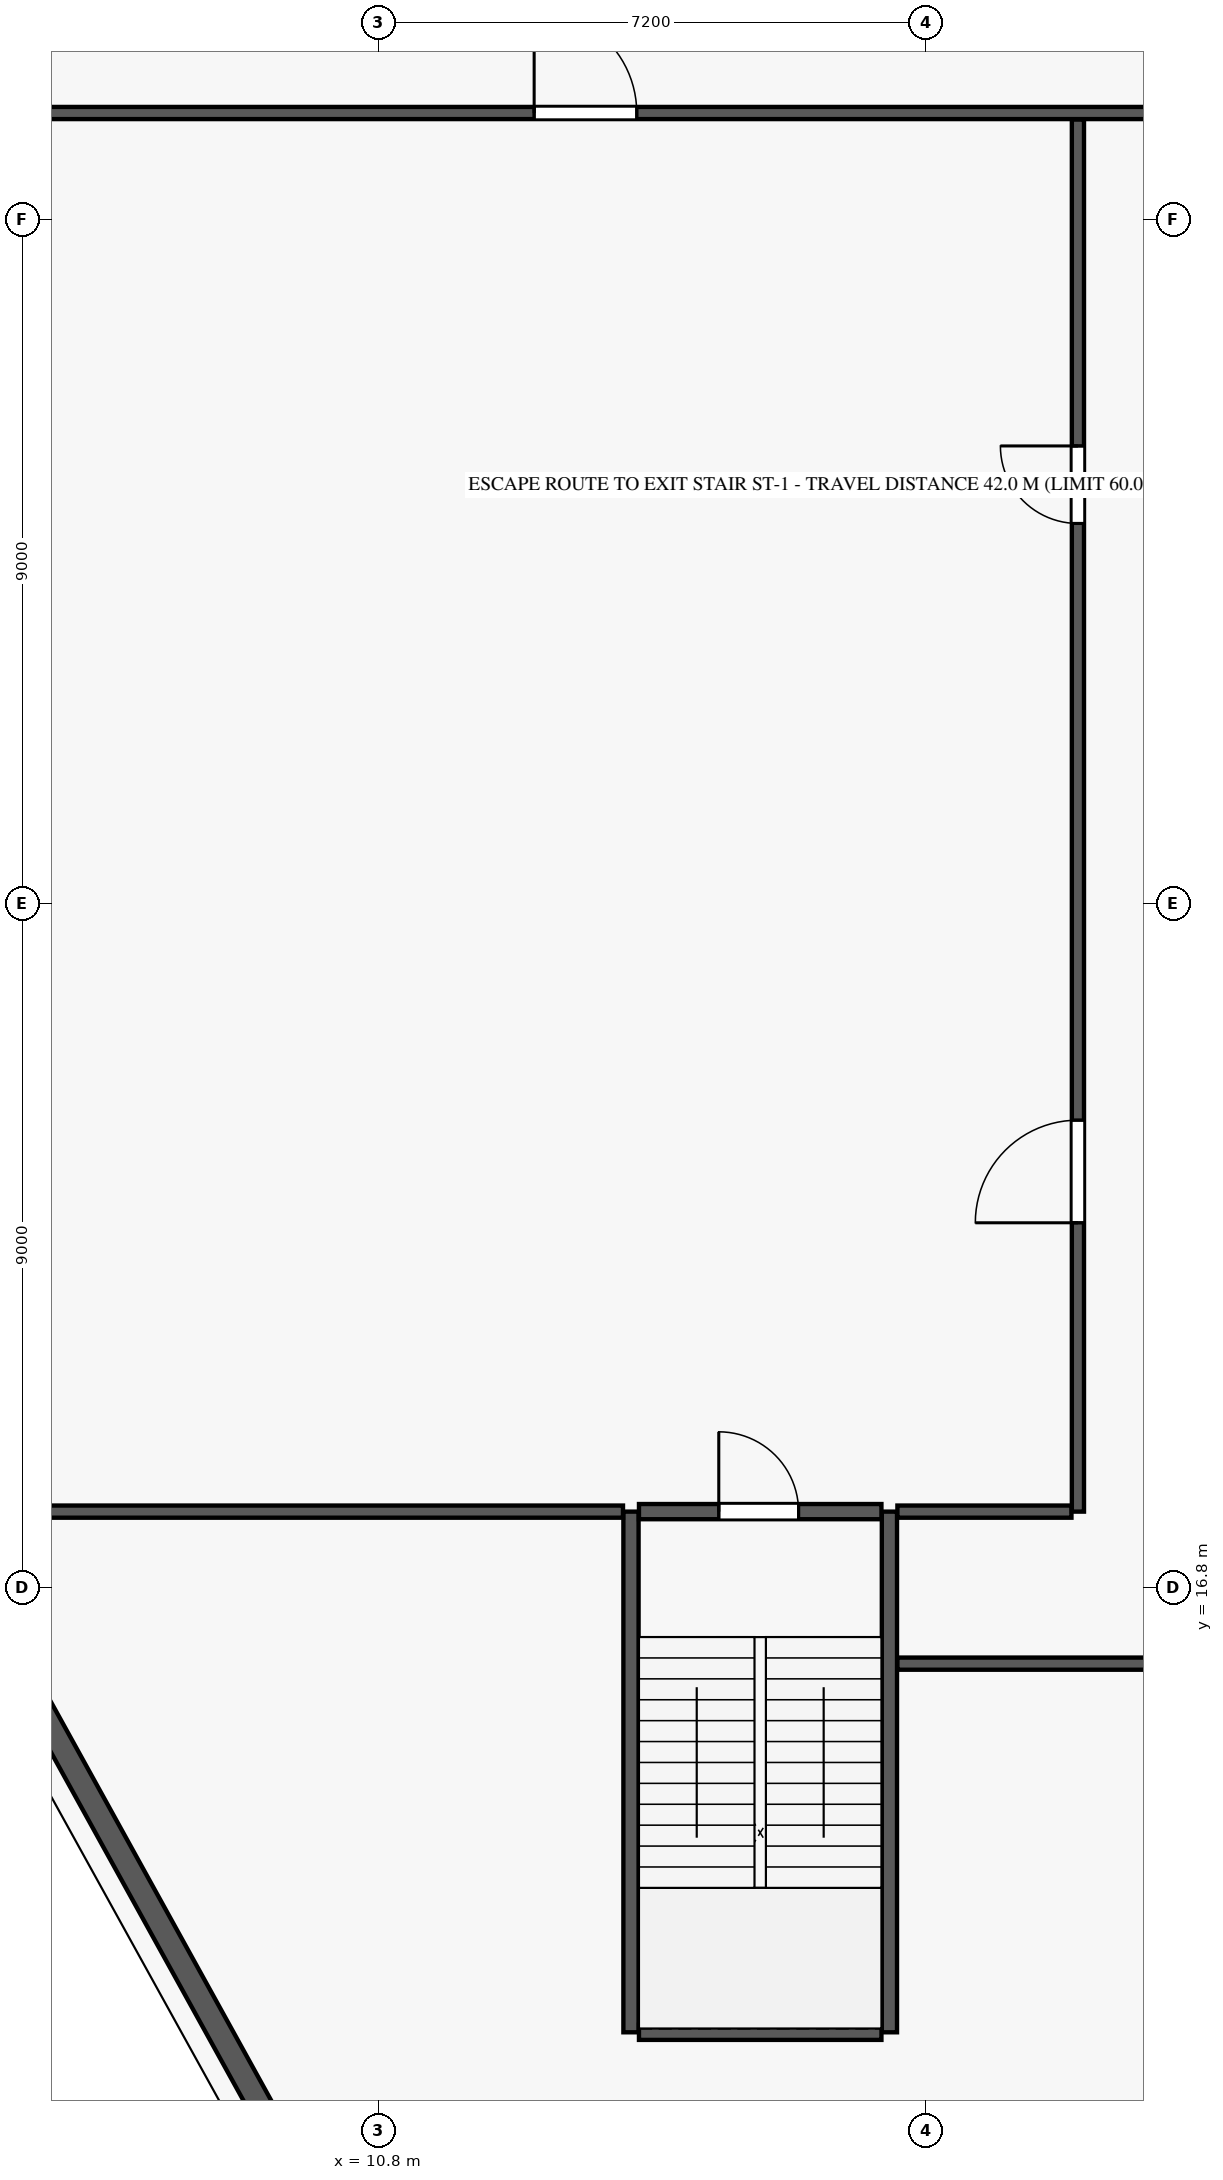
"""IFC4 building model, lengths in metres.
Left out: names, types, materials, properties, quantities, classifications, styles, units other than length and angle.
Written with IfcOpenShell. Run it as: python <this file> out.ifc"""

import sys

from ifc_helpers import new_model, si_unit, direction, frame, frame_2d, origin, place, context, subcontext, project, spatial, rectangle, extrude, element, fill, save


model = new_model("IFC4")
c1 = context("Model", 3, precision=1e-05, world=origin(), true_north=direction((0.0, 1.0)))
c2 = subcontext(c1, "Body", "Model", "MODEL_VIEW")
j1 = project(units=[si_unit("LENGTHUNIT", "METRE"), si_unit("PLANEANGLEUNIT", "RADIAN")], contexts=[c1])
p1 = place(None, origin())
s1 = spatial("IfcSite", under=j1, at=p1, CompositionType="ELEMENT")
p2 = place(p1, origin())
s2 = spatial("IfcBuilding", under=s1, at=p2, CompositionType="ELEMENT")
p3 = place(p2, frame((0.0, 0.0, 10.5)))
s3 = spatial("IfcBuildingStorey", under=s2, at=p3, CompositionType="ELEMENT", Elevation=10.5)
for number, where, z_axis, x_axis in (
    (1, (14.12, 10.95, 0.0), (0.0, 0.0, 1.0), (0.0, 1.0, 0.0)),
    (2, (17.52, 10.95, 0.0), (0.0, 0.0, 1.0), (0.0, 1.0, 0.0)),
):
    element("IfcWall", number, at=place(p3, frame(where, z_axis=z_axis, x_axis=x_axis)), inside=s3, PredefinedType="SHEAR", context=c2, shape_type="SweptSolid", body=[
        extrude(rectangle(XDim=6.85, YDim=0.2, at=frame_2d((3.425, 0.0))), origin(), (0.0, 0.0, 1.0), 4.5),
    ])
p4 = place(p3, frame((14.225, 10.95, 0.0), z_axis=(0.0, 0.0, 1.0), x_axis=(1.0, 0.0, 0.0)))
e3 = element("IfcWall", 3, at=p4, inside=s3, PredefinedType="PLUMBINGWALL", context=c2, shape_type="SweptSolid", body=[
    extrude(rectangle(XDim=3.19, YDim=0.2, at=frame_2d((1.595, 0.0))), origin(), (0.0, 0.0, 1.0), 4.25),
])
p5 = place(p3, frame((14.225, 17.8, 0.0), z_axis=(0.0, 0.0, 1.0), x_axis=(1.0, 0.0, 0.0)))
e4 = element("IfcWall", 4, at=p5, inside=s3, PredefinedType="PLUMBINGWALL", context=c2, shape_type="SweptSolid", body=[
    extrude(rectangle(XDim=3.19, YDim=0.2, at=frame_2d((1.595, 0.0))), origin(), (0.0, 0.0, 1.0), 4.25),
])
p6 = place(p5, frame((1.05, 0.0, 0.0)))
e5 = element("IfcOpeningElement", 5, at=p6, cuts=e4, PredefinedType="OPENING", context=c2, shape_type="SweptSolid", body=[
    extrude(rectangle(XDim=1.05, YDim=2.15, at=frame_2d((0.525, 1.075))), frame((0.0, 0.11, 0.0), z_axis=(0.0, -1.0, 0.0), x_axis=(1.0, 0.0, 0.0)), (0.0, 0.0, 1.0), 0.22),
])
p7 = place(p3, frame((17.625, 15.8, 0.0), z_axis=(0.0, 0.0, 1.0), x_axis=(1.0, 0.0, 0.0)))
e6 = element("IfcWall", 6, at=p7, inside=s3, PredefinedType="PARTITIONING", context=c2, shape_type="SweptSolid", body=[
    extrude(rectangle(XDim=29.59, YDim=0.16, at=frame_2d((14.795, 0.0))), origin(), (0.0, 0.0, 1.0), 4.25),
])
p8 = place(p7, frame((3.5, 0.0, 0.0)))
e7 = element("IfcOpeningElement", 7, at=p8, cuts=e6, PredefinedType="OPENING", context=c2, shape_type="SweptSolid", body=[
    extrude(rectangle(XDim=1.35, YDim=2.35, at=frame_2d((0.675, 1.175))), frame((0.0, 0.09, 0.0), z_axis=(0.0, -1.0, 0.0), x_axis=(1.0, 0.0, 0.0)), (0.0, 0.0, 1.0), 0.18),
])
p9 = place(p7, frame((24.5, 0.0, 0.0)))
e8 = element("IfcOpeningElement", 8, at=p9, cuts=e6, PredefinedType="OPENING", context=c2, shape_type="SweptSolid", body=[
    extrude(rectangle(XDim=1.35, YDim=2.35, at=frame_2d((0.675, 1.175))), frame((0.0, 0.09, 0.0), z_axis=(0.0, -1.0, 0.0), x_axis=(1.0, 0.0, 0.0)), (0.0, 0.0, 1.0), 0.18),
])
p10 = place(p3, frame((17.625, 17.8, 0.0), z_axis=(0.0, 0.0, 1.0), x_axis=(1.0, 0.0, 0.0)))
e9 = element("IfcWall", 9, at=p10, inside=s3, PredefinedType="PARTITIONING", context=c2, shape_type="SweptSolid", body=[
    extrude(rectangle(XDim=2.29, YDim=0.16, at=frame_2d((1.145, 0.0))), origin(), (0.0, 0.0, 1.0), 4.25),
])
p11 = place(p3, frame((5.02, 17.8, 0.0), z_axis=(0.0, 0.0, 1.0), x_axis=(1.0, 0.0, 0.0)))
e10 = element("IfcWall", 10, at=p11, inside=s3, PredefinedType="PARTITIONING", context=c2, shape_type="SweptSolid", body=[
    extrude(rectangle(XDim=8.995, YDim=0.16, at=frame_2d((4.498, 0.0))), origin(), (0.0, 0.0, 1.0), 4.25),
])
p12 = place(p3, frame((20.0, 17.8, 0.0), z_axis=(0.0, 0.0, 1.0), x_axis=(0.0, 1.0, 0.0)))
e11 = element("IfcWall", 11, at=p12, inside=s3, PredefinedType="PARTITIONING", context=c2, shape_type="SweptSolid", body=[
    extrude(rectangle(XDim=18.315, YDim=0.16, at=frame_2d((9.157, 0.0))), origin(), (0.0, 0.0, 1.0), 4.25),
])
p13 = place(p12, frame((3.8, 0.0, 0.0)))
e12 = element("IfcOpeningElement", 12, at=p13, cuts=e11, PredefinedType="OPENING", context=c2, shape_type="SweptSolid", body=[
    extrude(rectangle(XDim=1.35, YDim=2.35, at=frame_2d((0.675, 1.175))), frame((0.0, 0.09, 0.0), z_axis=(0.0, -1.0, 0.0), x_axis=(1.0, 0.0, 0.0)), (0.0, 0.0, 1.0), 0.18),
])
p14 = place(p12, frame((13.0, 0.0, 0.0)))
e13 = element("IfcOpeningElement", 13, at=p14, cuts=e11, PredefinedType="OPENING", context=c2, shape_type="SweptSolid", body=[
    extrude(rectangle(XDim=1.02, YDim=2.25, at=frame_2d((0.51, 1.125))), frame((0.0, 0.09, 0.0), z_axis=(0.0, -1.0, 0.0), x_axis=(1.0, 0.0, 0.0)), (0.0, 0.0, 1.0), 0.18),
])
p15 = place(p3, frame((6.346, 36.2, 0.0), z_axis=(0.0, 0.0, 1.0), x_axis=(1.0, 0.0, 0.0)))
e14 = element("IfcWall", 14, at=p15, inside=s3, PredefinedType="PARTITIONING", context=c2, shape_type="SweptSolid", body=[
    extrude(rectangle(XDim=52.108, YDim=0.16, at=frame_2d((26.054, 0.0))), origin(), (0.0, 0.0, 1.0), 4.25),
])
p16 = place(p15, frame((6.5, 0.0, 0.0)))
e15 = element("IfcOpeningElement", 15, at=p16, cuts=e14, PredefinedType="OPENING", context=c2, shape_type="SweptSolid", body=[
    extrude(rectangle(XDim=1.35, YDim=2.35, at=frame_2d((0.675, 1.175))), frame((0.0, 0.09, 0.0), z_axis=(0.0, -1.0, 0.0), x_axis=(1.0, 0.0, 0.0)), (0.0, 0.0, 1.0), 0.18),
])
p17 = place(p15, frame((26.5, 0.0, 0.0)))
e16 = element("IfcOpeningElement", 16, at=p17, cuts=e14, PredefinedType="OPENING", context=c2, shape_type="SweptSolid", body=[
    extrude(rectangle(XDim=1.35, YDim=2.35, at=frame_2d((0.675, 1.175))), frame((0.0, 0.09, 0.0), z_axis=(0.0, -1.0, 0.0), x_axis=(1.0, 0.0, 0.0)), (0.0, 0.0, 1.0), 0.18),
])
p18 = place(p3, frame((4.419, 18.711, 0.0), z_axis=(0.0, 0.0, 1.0), x_axis=(0.483698591046, -0.875234638837, 0.0)))
e17 = element("IfcWall", 17, at=p18, inside=s3, PredefinedType="STANDARD", context=c2, shape_type="SweptSolid", body=[
    extrude(rectangle(XDim=13.015, YDim=0.32, at=frame_2d((6.507, 0.0))), origin(), (0.0, 0.0, 1.0), 4.25),
])
p19 = place(p18, frame((5.607, 0.0, 0.75)))
e18 = element("IfcOpeningElement", 18, at=p19, cuts=e17, PredefinedType="OPENING", context=c2, shape_type="SweptSolid", body=[
    extrude(rectangle(XDim=1.8, YDim=2.4, at=frame_2d((0.9, 1.2))), frame((0.0, 0.17, 0.0), z_axis=(0.0, -1.0, 0.0), x_axis=(1.0, 0.0, 0.0)), (0.0, 0.0, 1.0), 0.34),
])
p20 = place(p6, origin())
e19 = element("IfcDoor", 19, at=p20, inside=s3, OperationType="SINGLE_SWING_LEFT", PredefinedType="DOOR", context=c2, shape_type="SweptSolid", body=[
    extrude(rectangle(XDim=1.05, YDim=2.15, at=frame_2d((0.525, 1.075))), frame((0.0, 0.025, 0.0), z_axis=(0.0, -1.0, 0.0), x_axis=(1.0, 0.0, 0.0)), (0.0, 0.0, 1.0), 0.05),
])
fill(e5, e19)
p21 = place(p13, origin())
e20 = element("IfcDoor", 20, at=p21, inside=s3, OperationType="SINGLE_SWING_LEFT", PredefinedType="DOOR", context=c2, shape_type="SweptSolid", body=[
    extrude(rectangle(XDim=1.35, YDim=2.35, at=frame_2d((0.675, 1.175))), frame((0.0, 0.025, 0.0), z_axis=(0.0, -1.0, 0.0), x_axis=(1.0, 0.0, 0.0)), (0.0, 0.0, 1.0), 0.05),
])
fill(e12, e20)
p22 = place(p14, origin())
e21 = element("IfcDoor", 21, at=p22, inside=s3, OperationType="SINGLE_SWING_RIGHT", PredefinedType="DOOR", context=c2, shape_type="SweptSolid", body=[
    extrude(rectangle(XDim=1.02, YDim=2.25, at=frame_2d((0.51, 1.125))), frame((0.0, 0.025, 0.0), z_axis=(0.0, -1.0, 0.0), x_axis=(1.0, 0.0, 0.0)), (0.0, 0.0, 1.0), 0.05),
])
fill(e13, e21)
p23 = place(p16, origin())
e22 = element("IfcDoor", 22, at=p23, inside=s3, OperationType="SINGLE_SWING_LEFT", PredefinedType="DOOR", context=c2, shape_type="SweptSolid", body=[
    extrude(rectangle(XDim=1.35, YDim=2.35, at=frame_2d((0.675, 1.175))), frame((0.0, 0.025, 0.0), z_axis=(0.0, -1.0, 0.0), x_axis=(1.0, 0.0, 0.0)), (0.0, 0.0, 1.0), 0.05),
])
fill(e15, e22)
p24 = place(p19, origin())
e23 = element("IfcWindow", 23, at=p24, inside=s3, PartitioningType="SINGLE_PANEL", PredefinedType="WINDOW", context=c2, shape_type="SweptSolid", body=[
    extrude(rectangle(XDim=1.8, YDim=2.4, at=frame_2d((0.9, 1.2))), frame((0.0, 0.03, 0.0), z_axis=(0.0, -1.0, 0.0), x_axis=(1.0, 0.0, 0.0)), (0.0, 0.0, 1.0), 0.06),
])
fill(e18, e23)
save(model, sys.argv[1])
